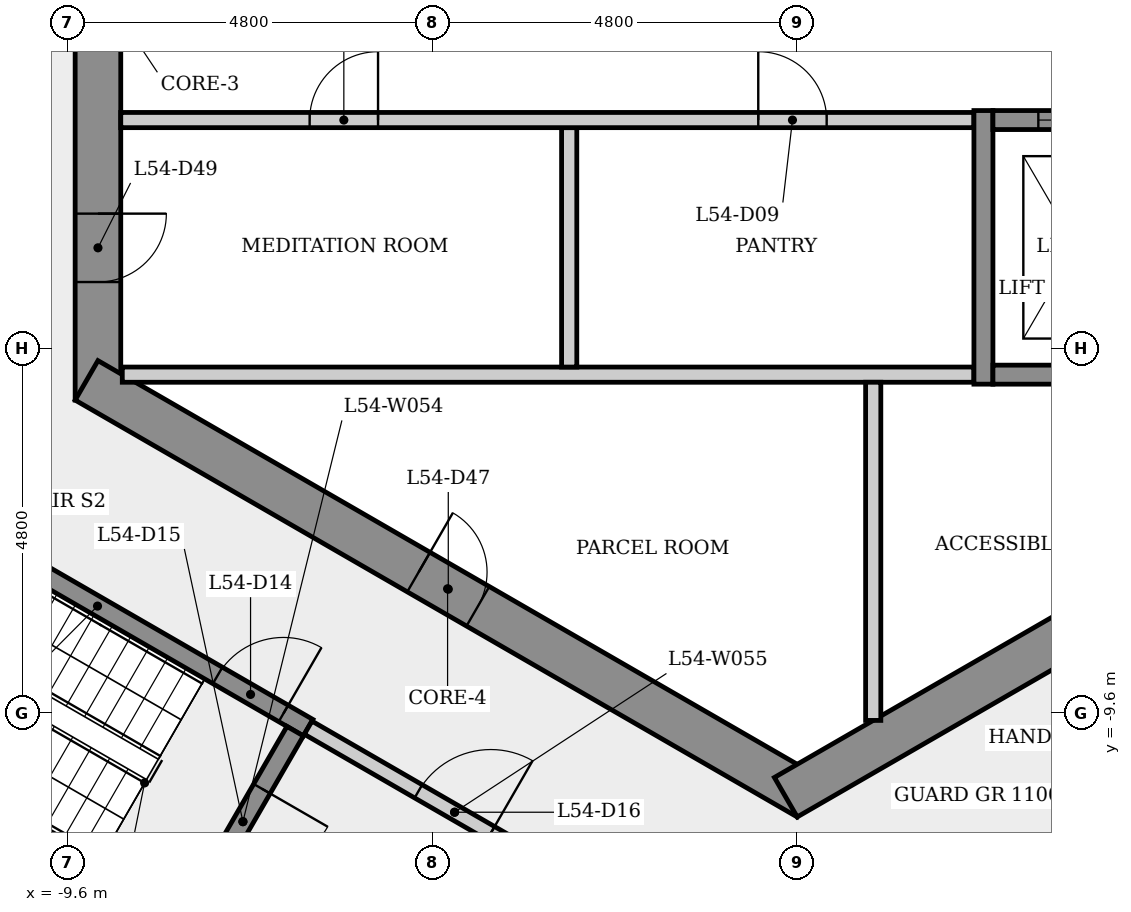
"""IFC4 building model, lengths in metres.
Left out: names, types, materials, properties, quantities, classifications, styles, units other than length and angle.
Written with IfcOpenShell. Run it as: python <this file> out.ifc"""

import sys

from ifc_helpers import new_model, si_unit, direction, frame, frame_2d, origin, place, context, subcontext, project, spatial, rectangle, extrude, element, fill, save


model = new_model("IFC4")
c1 = context("Model", 3, precision=1e-05, world=origin(), true_north=direction((0.0, 1.0)))
c2 = subcontext(c1, "Body", "Model", "MODEL_VIEW")
j1 = project(units=[si_unit("LENGTHUNIT", "METRE"), si_unit("PLANEANGLEUNIT", "RADIAN")], contexts=[c1])
p1 = place(None, origin())
s1 = spatial("IfcSite", under=j1, at=p1, CompositionType="ELEMENT")
p2 = place(p1, origin())
s2 = spatial("IfcBuilding", under=s1, at=p2, CompositionType="ELEMENT")
p3 = place(p2, frame((0.0, 0.0, 202.1)))
s3 = spatial("IfcBuildingStorey", under=s2, at=p3, CompositionType="ELEMENT", Elevation=202.1)
p4 = place(p3, frame((-9.2, 5.485, 0.0), z_axis=(0.0, 0.0, 1.0), x_axis=(0.0, -1.0, 0.0)))
e1 = element("IfcWall", 1, at=p4, inside=s3, PredefinedType="SHEAR", context=c2, shape_type="SweptSolid", body=[
    extrude(rectangle(XDim=10.97, YDim=0.6, at=frame_2d((5.485, 0.0))), origin(), (0.0, 0.0, 1.0), 4.0),
])
p5 = place(p4, frame((8.516, 0.0, 0.0)))
e2 = element("IfcOpeningElement", 2, at=p5, cuts=e1, PredefinedType="OPENING", context=c2, shape_type="SweptSolid", body=[
    extrude(rectangle(XDim=0.9, YDim=2.1, at=frame_2d((0.45, 1.05))), frame((0.0, 0.31, 0.0), z_axis=(0.0, -1.0, 0.0), x_axis=(1.0, 0.0, 0.0)), (0.0, 0.0, 1.0), 0.62),
])
p6 = place(p4, frame((4.685, 0.0, 0.0)))
e3 = element("IfcOpeningElement", 3, at=p6, cuts=e1, PredefinedType="OPENING", context=c2, shape_type="SweptSolid", body=[
    extrude(rectangle(XDim=1.6, YDim=2.1, at=frame_2d((0.8, 1.05))), frame((0.0, 0.31, 0.0), z_axis=(0.0, -1.0, 0.0), x_axis=(1.0, 0.0, 0.0)), (0.0, 0.0, 1.0), 0.62),
])
p7 = place(p3, frame((-9.35, -5.225, 0.0), z_axis=(0.0, 0.0, 1.0), x_axis=(0.866023993627, -0.500002442456, 0.0)))
e4 = element("IfcWall", 4, at=p7, inside=s3, PredefinedType="SHEAR", context=c2, shape_type="SweptSolid", body=[
    extrude(rectangle(XDim=10.97, YDim=0.6, at=frame_2d((5.485, 0.0))), origin(), (0.0, 0.0, 1.0), 4.0),
])
p8 = place(p7, frame((5.045, 0.0, 0.0)))
e5 = element("IfcOpeningElement", 5, at=p8, cuts=e4, PredefinedType="OPENING", context=c2, shape_type="SweptSolid", body=[
    extrude(rectangle(XDim=0.9, YDim=2.1, at=frame_2d((0.45, 1.05))), frame((0.0, 0.31, 0.0), z_axis=(0.0, -1.0, 0.0), x_axis=(1.0, 0.0, 0.0)), (0.0, 0.0, 1.0), 0.62),
])
p9 = place(p3, frame((-0.15, -10.71, 0.0), z_axis=(0.0, 0.0, 1.0), x_axis=(0.866023993627, 0.500002442456, 0.0)))
e6 = element("IfcWall", 6, at=p9, inside=s3, PredefinedType="SHEAR", context=c2, shape_type="SweptSolid", body=[
    extrude(rectangle(XDim=10.97, YDim=0.6, at=frame_2d((5.485, 0.0))), origin(), (0.0, 0.0, 1.0), 4.0),
])
p10 = place(p9, frame((7.281, 0.0, 0.0)))
e7 = element("IfcOpeningElement", 7, at=p10, cuts=e6, PredefinedType="OPENING", context=c2, shape_type="SweptSolid", body=[
    extrude(rectangle(XDim=0.9, YDim=2.1, at=frame_2d((0.45, 1.05))), frame((0.0, 0.31, 0.0), z_axis=(0.0, -1.0, 0.0), x_axis=(1.0, 0.0, 0.0)), (0.0, 0.0, 1.0), 0.62),
])
p11 = place(p3, frame((-11.977, -6.595, 0.0), z_axis=(0.0, 0.0, 1.0), x_axis=(0.866025499775, -0.499999833739, 0.0)))
e8 = element("IfcWall", 8, at=p11, inside=s3, PredefinedType="SHEAR", context=c2, shape_type="SweptSolid", body=[
    extrude(rectangle(XDim=6.4, YDim=0.25, at=frame_2d((3.2, 0.0))), origin(), (0.0, 0.0, 1.0), 3.6),
])
p12 = place(p11, frame((5.025, 0.0, 0.0)))
e9 = element("IfcOpeningElement", 9, at=p12, cuts=e8, PredefinedType="OPENING", context=c2, shape_type="SweptSolid", body=[
    extrude(rectangle(XDim=1.0, YDim=2.1, at=frame_2d((0.5, 1.05))), frame((0.0, 0.135, 0.0), z_axis=(0.0, -1.0, 0.0), x_axis=(1.0, 0.0, 0.0)), (0.0, 0.0, 1.0), 0.27),
])
p13 = place(p3, frame((-8.88, -5.15, 0.0), z_axis=(0.0, 0.0, 1.0), x_axis=(1.0, 0.0, 0.0)))
e10 = element("IfcWall", 10, at=p13, inside=s3, PredefinedType="PARTITIONING", context=c2, shape_type="SweptSolid", body=[
    extrude(rectangle(XDim=11.205, YDim=0.2, at=frame_2d((5.603, 0.0))), origin(), (0.0, 0.0, 1.0), 3.6),
])
p14 = place(p3, frame((-7.935, -12.393, 0.0), z_axis=(0.0, 0.0, 1.0), x_axis=(-0.866031063448, 0.499990197047, 0.0)))
e11 = element("IfcWall", 11, at=p14, inside=s3, PredefinedType="SHEAR", context=c2, shape_type="SweptSolid", body=[
    extrude(rectangle(XDim=6.525, YDim=0.25, at=frame_2d((3.263, 0.0))), origin(), (0.0, 0.0, 1.0), 3.6),
])
p15 = place(p3, frame((-6.605, -9.841, 0.0), z_axis=(0.0, 0.0, 1.0), x_axis=(-0.499996545922, -0.866027397988, 0.0)))
e12 = element("IfcWall", 12, at=p15, inside=s3, PredefinedType="SHEAR", context=c2, shape_type="SweptSolid", body=[
    extrude(rectangle(XDim=2.75, YDim=0.25, at=frame_2d((1.375, 0.0))), origin(), (0.0, 0.0, 1.0), 3.6),
])
p16 = place(p15, frame((0.875, 0.0, 0.0)))
e13 = element("IfcOpeningElement", 13, at=p16, cuts=e12, PredefinedType="OPENING", context=c2, shape_type="SweptSolid", body=[
    extrude(rectangle(XDim=1.0, YDim=2.1, at=frame_2d((0.5, 1.05))), frame((0.0, 0.135, 0.0), z_axis=(0.0, -1.0, 0.0), x_axis=(1.0, 0.0, 0.0)), (0.0, 0.0, 1.0), 0.27),
])
p17 = place(p3, frame((-6.435, -9.795, 0.0), z_axis=(0.0, 0.0, 1.0), x_axis=(0.866012907634, -0.500021643343, 0.0)))
e14 = element("IfcWall", 14, at=p17, inside=s3, PredefinedType="PARTITIONING", context=c2, shape_type="SweptSolid", body=[
    extrude(rectangle(XDim=4.45, YDim=0.2, at=frame_2d((2.225, 0.0))), origin(), (0.0, 0.0, 1.0), 3.6),
])
p18 = place(p17, frame((1.675, 0.0, 0.0)))
e15 = element("IfcOpeningElement", 15, at=p18, cuts=e14, PredefinedType="OPENING", context=c2, shape_type="SweptSolid", body=[
    extrude(rectangle(XDim=1.1, YDim=2.1, at=frame_2d((0.55, 1.05))), frame((0.0, 0.11, 0.0), z_axis=(0.0, -1.0, 0.0), x_axis=(1.0, 0.0, 0.0)), (0.0, 0.0, 1.0), 0.22),
])
p19 = place(p3, frame((-3.0, -1.9, 0.0), z_axis=(0.0, 0.0, 1.0), x_axis=(0.0, -1.0, 0.0)))
e16 = element("IfcWall", 16, at=p19, inside=s3, PredefinedType="PARTITIONING", context=c2, shape_type="SweptSolid", body=[
    extrude(rectangle(XDim=3.15, YDim=0.2, at=frame_2d((1.575, 0.0))), origin(), (0.0, 0.0, 1.0), 3.6),
])
p20 = place(p3, frame((-8.9, -1.8, 0.0), z_axis=(0.0, 0.0, 1.0), x_axis=(1.0, 0.0, 0.0)))
e17 = element("IfcWall", 17, at=p20, inside=s3, PredefinedType="PARTITIONING", context=c2, shape_type="SweptSolid", body=[
    extrude(rectangle(XDim=11.225, YDim=0.2, at=frame_2d((5.613, 0.0))), origin(), (0.0, 0.0, 1.0), 3.6),
])
p21 = place(p20, frame((2.485, 0.0, 0.0)))
e18 = element("IfcOpeningElement", 18, at=p21, cuts=e17, PredefinedType="OPENING", context=c2, shape_type="SweptSolid", body=[
    extrude(rectangle(XDim=0.9, YDim=2.1, at=frame_2d((0.45, 1.05))), frame((0.0, 0.11, 0.0), z_axis=(0.0, -1.0, 0.0), x_axis=(1.0, 0.0, 0.0)), (0.0, 0.0, 1.0), 0.22),
])
p22 = place(p20, frame((8.387, 0.0, 0.0)))
e19 = element("IfcOpeningElement", 19, at=p22, cuts=e17, PredefinedType="OPENING", context=c2, shape_type="SweptSolid", body=[
    extrude(rectangle(XDim=0.9, YDim=2.1, at=frame_2d((0.45, 1.05))), frame((0.0, 0.11, 0.0), z_axis=(0.0, -1.0, 0.0), x_axis=(1.0, 0.0, 0.0)), (0.0, 0.0, 1.0), 0.22),
])
p23 = place(p3, frame((1.0, -5.25, 0.0), z_axis=(0.0, 0.0, 1.0), x_axis=(0.0, -1.0, 0.0)))
e20 = element("IfcWall", 20, at=p23, inside=s3, PredefinedType="PARTITIONING", context=c2, shape_type="SweptSolid", body=[
    extrude(rectangle(XDim=4.449, YDim=0.2, at=frame_2d((2.225, 0.0))), origin(), (0.0, 0.0, 1.0), 3.6),
])
p24 = place(p3, frame((1.585, -12.595, 0.0), z_axis=(0.0, 0.0, 1.0), x_axis=(0.866036417653, 0.499980922934, 0.0)))
e21 = element("IfcWall", 21, at=p24, inside=s3, PredefinedType="SHEAR", context=c2, shape_type="SweptSolid", body=[
    extrude(rectangle(XDim=6.65, YDim=0.25, at=frame_2d((3.325, 0.0))), origin(), (0.0, 0.0, 1.0), 3.6),
])
p25 = place(p24, frame((5.275, 0.0, 0.0)))
e22 = element("IfcOpeningElement", 22, at=p25, cuts=e21, PredefinedType="OPENING", context=c2, shape_type="SweptSolid", body=[
    extrude(rectangle(XDim=1.0, YDim=2.1, at=frame_2d((0.5, 1.05))), frame((0.0, 0.135, 0.0), z_axis=(0.0, -1.0, 0.0), x_axis=(1.0, 0.0, 0.0)), (0.0, 0.0, 1.0), 0.27),
])
p26 = place(p3, frame((2.45, -5.275, 0.0), z_axis=(0.0, 0.0, 1.0), x_axis=(0.0, 1.0, 0.0)))
e23 = element("IfcWall", 23, at=p26, inside=s3, PredefinedType="SHEAR", context=c2, shape_type="SweptSolid", body=[
    extrude(rectangle(XDim=3.6, YDim=0.25, at=frame_2d((1.8, 0.0))), origin(), (0.0, 0.0, 1.0), 3.6),
])
p27 = place(p3, frame((2.575, -5.15, 0.0), z_axis=(0.0, 0.0, 1.0), x_axis=(1.0, 0.0, 0.0)))
e24 = element("IfcWall", 24, at=p27, inside=s3, PredefinedType="SHEAR", context=c2, shape_type="SweptSolid", body=[
    extrude(rectangle(XDim=4.9, YDim=0.25, at=frame_2d((2.45, 0.0))), origin(), (0.0, 0.0, 1.0), 3.6),
])
p28 = place(p3, frame((2.575, -1.8, 0.0), z_axis=(0.0, 0.0, 1.0), x_axis=(1.0, 0.0, 0.0)))
e25 = element("IfcWall", 25, at=p28, inside=s3, PredefinedType="SHEAR", context=c2, shape_type="SweptSolid", body=[
    extrude(rectangle(XDim=4.9, YDim=0.25, at=frame_2d((2.45, 0.0))), origin(), (0.0, 0.0, 1.0), 3.6),
])
p29 = place(p28, frame((0.597, 0.0, 0.0)))
e26 = element("IfcOpeningElement", 26, at=p29, cuts=e25, PredefinedType="OPENING", context=c2, shape_type="SweptSolid", body=[
    extrude(rectangle(XDim=1.1, YDim=2.1, at=frame_2d((0.55, 1.05))), frame((0.0, 0.135, 0.0), z_axis=(0.0, -1.0, 0.0), x_axis=(1.0, 0.0, 0.0)), (0.0, 0.0, 1.0), 0.27),
])
p30 = place(p29, origin())
e27 = element("IfcDoor", 27, at=p30, inside=s3, OperationType="SLIDING_TO_LEFT", PredefinedType="DOOR", context=c2, shape_type="SweptSolid", body=[
    extrude(rectangle(XDim=1.1, YDim=2.1, at=frame_2d((0.55, 1.05))), frame((0.0, 0.025, 0.0), z_axis=(0.0, -1.0, 0.0), x_axis=(1.0, 0.0, 0.0)), (0.0, 0.0, 1.0), 0.05),
])
fill(e26, e27)
p31 = place(p21, origin())
e28 = element("IfcDoor", 28, at=p31, inside=s3, OperationType="SINGLE_SWING_RIGHT", PredefinedType="DOOR", context=c2, shape_type="SweptSolid", body=[
    extrude(rectangle(XDim=0.9, YDim=2.1, at=frame_2d((0.45, 1.05))), frame((0.0, 0.025, 0.0), z_axis=(0.0, -1.0, 0.0), x_axis=(1.0, 0.0, 0.0)), (0.0, 0.0, 1.0), 0.05),
])
fill(e18, e28)
p32 = place(p22, origin())
e29 = element("IfcDoor", 29, at=p32, inside=s3, OperationType="SINGLE_SWING_LEFT", PredefinedType="DOOR", context=c2, shape_type="SweptSolid", body=[
    extrude(rectangle(XDim=0.9, YDim=2.1, at=frame_2d((0.45, 1.05))), frame((0.0, 0.025, 0.0), z_axis=(0.0, -1.0, 0.0), x_axis=(1.0, 0.0, 0.0)), (0.0, 0.0, 1.0), 0.05),
])
fill(e19, e29)
p33 = place(p12, origin())
e30 = element("IfcDoor", 30, at=p33, inside=s3, OperationType="SINGLE_SWING_RIGHT", PredefinedType="DOOR", context=c2, shape_type="SweptSolid", body=[
    extrude(rectangle(XDim=1.0, YDim=2.1, at=frame_2d((0.5, 1.05))), frame((0.0, 0.025, 0.0), z_axis=(0.0, -1.0, 0.0), x_axis=(1.0, 0.0, 0.0)), (0.0, 0.0, 1.0), 0.05),
])
fill(e9, e30)
p34 = place(p16, origin())
e31 = element("IfcDoor", 31, at=p34, inside=s3, OperationType="SINGLE_SWING_LEFT", PredefinedType="DOOR", context=c2, shape_type="SweptSolid", body=[
    extrude(rectangle(XDim=1.0, YDim=2.1, at=frame_2d((0.5, 1.05))), frame((0.0, 0.025, 0.0), z_axis=(0.0, -1.0, 0.0), x_axis=(1.0, 0.0, 0.0)), (0.0, 0.0, 1.0), 0.05),
])
fill(e13, e31)
p35 = place(p18, origin())
e32 = element("IfcDoor", 32, at=p35, inside=s3, OperationType="SINGLE_SWING_RIGHT", PredefinedType="DOOR", context=c2, shape_type="SweptSolid", body=[
    extrude(rectangle(XDim=1.1, YDim=2.1, at=frame_2d((0.55, 1.05))), frame((0.0, 0.025, 0.0), z_axis=(0.0, -1.0, 0.0), x_axis=(1.0, 0.0, 0.0)), (0.0, 0.0, 1.0), 0.05),
])
fill(e15, e32)
p36 = place(p8, origin())
e33 = element("IfcDoor", 33, at=p36, inside=s3, OperationType="SINGLE_SWING_LEFT", PredefinedType="DOOR", context=c2, shape_type="SweptSolid", body=[
    extrude(rectangle(XDim=0.9, YDim=2.1, at=frame_2d((0.45, 1.05))), frame((0.0, 0.025, 0.0), z_axis=(0.0, -1.0, 0.0), x_axis=(1.0, 0.0, 0.0)), (0.0, 0.0, 1.0), 0.05),
])
fill(e5, e33)
p37 = place(p5, origin())
e34 = element("IfcDoor", 34, at=p37, inside=s3, OperationType="SINGLE_SWING_LEFT", PredefinedType="DOOR", context=c2, shape_type="SweptSolid", body=[
    extrude(rectangle(XDim=0.9, YDim=2.1, at=frame_2d((0.45, 1.05))), frame((0.0, 0.025, 0.0), z_axis=(0.0, -1.0, 0.0), x_axis=(1.0, 0.0, 0.0)), (0.0, 0.0, 1.0), 0.05),
])
fill(e2, e34)
save(model, sys.argv[1])
